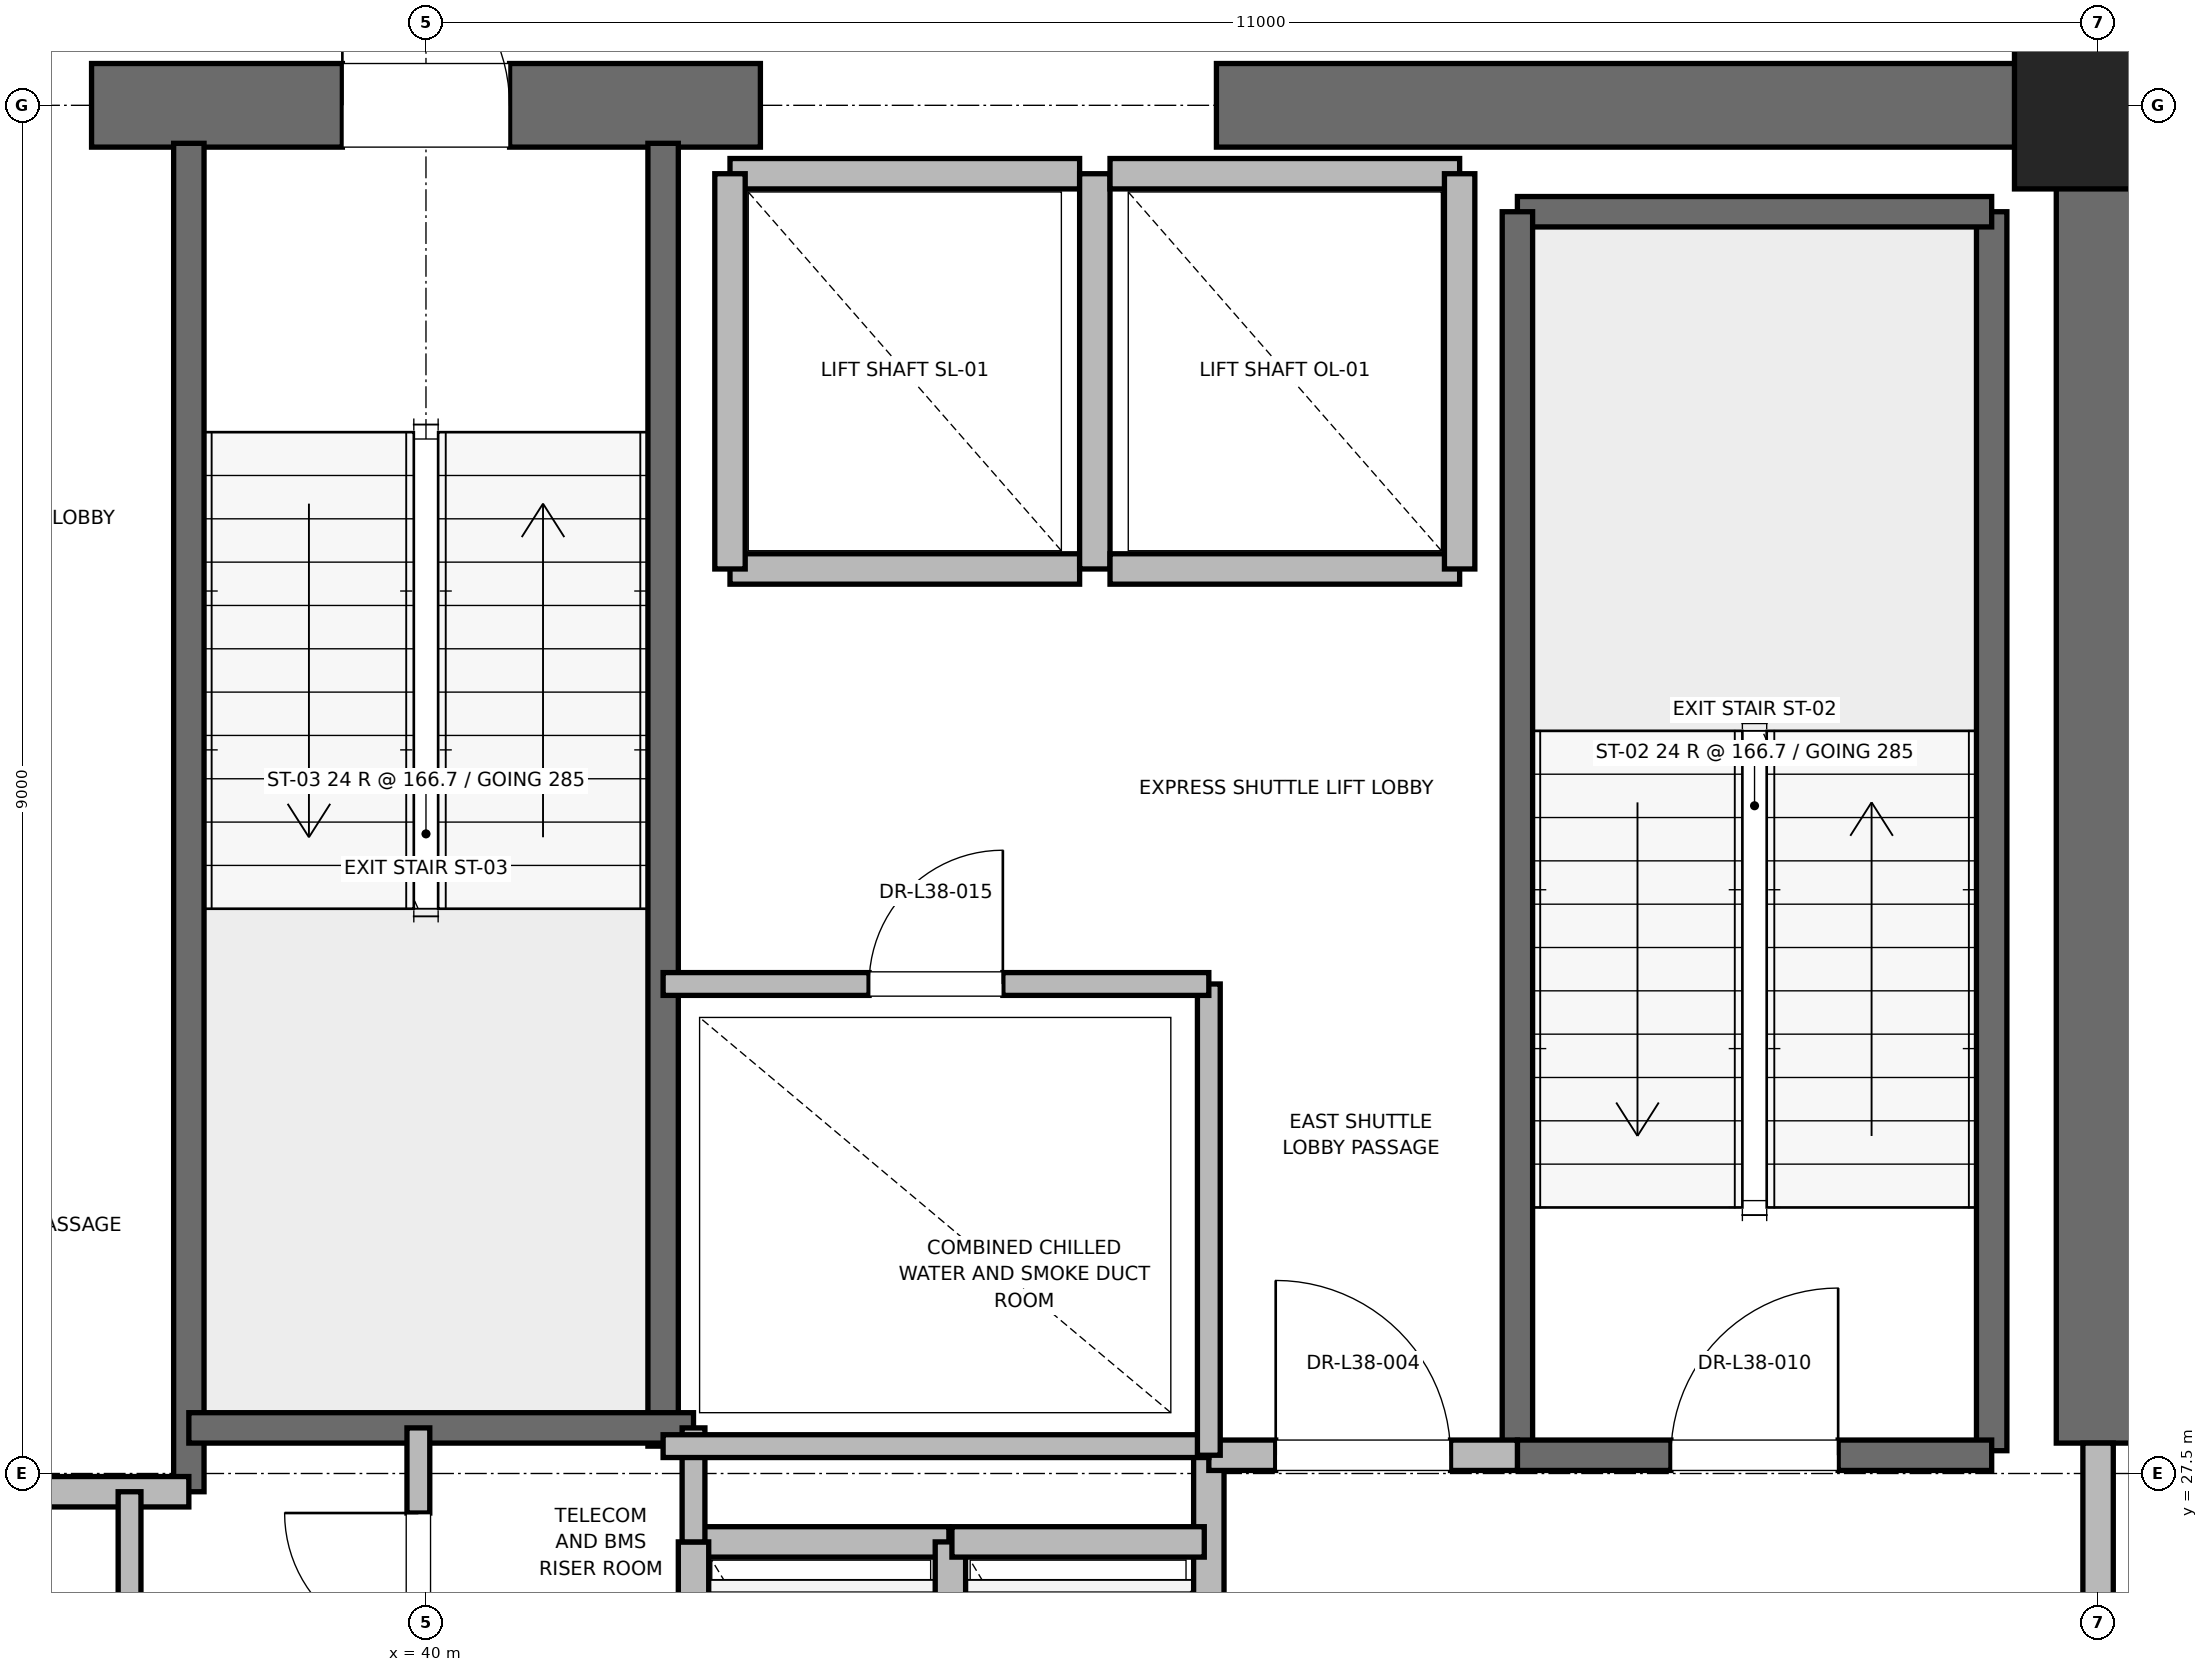
"""IFC4 building model, lengths in metres.
Left out: names, types, materials, properties, quantities, classifications, styles, units other than length and angle.
Written with IfcOpenShell. Run it as: python <this file> out.ifc"""

import sys

from ifc_helpers import new_model, si_unit, direction, frame, frame_2d, origin, origin_2d, place, context, subcontext, project, spatial, rectangle, extrude, element, fill, save


model = new_model("IFC4")
c1 = context("Model", 3, precision=1e-05, world=origin(), true_north=direction((0.0, 1.0)))
c2 = subcontext(c1, "Body", "Model", "MODEL_VIEW")
j1 = project(units=[si_unit("LENGTHUNIT", "METRE"), si_unit("PLANEANGLEUNIT", "RADIAN")], contexts=[c1])
p1 = place(None, origin())
s1 = spatial("IfcSite", under=j1, at=p1, CompositionType="ELEMENT")
p2 = place(p1, origin())
s2 = spatial("IfcBuilding", under=s1, at=p2, CompositionType="ELEMENT")
p3 = place(p2, frame((0.0, 0.0, 164.4)))
s3 = spatial("IfcBuildingStorey", under=s2, at=p3, CompositionType="ELEMENT", Elevation=164.4)
p4 = place(p3, frame((51.0, 36.5, 0.0), z_axis=(0.0, 0.0, 1.0), x_axis=(1.0, 0.0, 0.0)))
e1 = element("IfcColumn", 1, at=p4, inside=s3, PredefinedType="PILASTER", context=c2, shape_type="SweptSolid", body=[
    extrude(rectangle(XDim=1.1, YDim=1.1, at=origin_2d()), origin(), (0.0, 0.0, 1.0), 4.0),
])
p5 = place(p3, frame((37.8, 36.5, 0.0), z_axis=(0.0, 0.0, 1.0), x_axis=(1.0, 0.0, 0.0)))
e2 = element("IfcWall", 2, at=p5, inside=s3, PredefinedType="SHEAR", context=c2, shape_type="SweptSolid", body=[
    extrude(rectangle(XDim=4.4, YDim=0.55, at=frame_2d((2.2, 0.0))), origin(), (0.0, 0.0, 1.0), 3.775),
])
p6 = place(p5, frame((1.65, 0.0, 0.0)))
e3 = element("IfcOpeningElement", 3, at=p6, cuts=e2, PredefinedType="OPENING", context=c2, shape_type="SweptSolid", body=[
    extrude(rectangle(XDim=1.1, YDim=2.15, at=frame_2d((0.55, 1.075))), frame((0.0, 0.275, 0.0), z_axis=(0.0, -1.0, 0.0), x_axis=(1.0, 0.0, 0.0)), (0.0, 0.0, 1.0), 0.55),
])
p7 = place(p3, frame((45.2, 36.5, 0.0), z_axis=(0.0, 0.0, 1.0), x_axis=(1.0, 0.0, 0.0)))
e4 = element("IfcWall", 4, at=p7, inside=s3, PredefinedType="SHEAR", context=c2, shape_type="SweptSolid", body=[
    extrude(rectangle(XDim=5.8, YDim=0.55, at=frame_2d((2.9, 0.0))), origin(), (0.0, 0.0, 1.0), 3.775),
])
p8 = place(p3, frame((51.0, 27.7, 0.0), z_axis=(0.0, 0.0, 1.0), x_axis=(0.0, 1.0, 0.0)))
e5 = element("IfcWall", 5, at=p8, inside=s3, PredefinedType="SHEAR", context=c2, shape_type="SweptSolid", body=[
    extrude(rectangle(XDim=8.8, YDim=0.55, at=frame_2d((4.4, 0.0))), origin(), (0.0, 0.0, 1.0), 3.775),
])
p9 = place(p3, frame((50.3, 27.65, 0.0), z_axis=(0.0, 0.0, 1.0), x_axis=(0.0, 1.0, 0.0)))
e6 = element("IfcWall", 6, at=p9, inside=s3, PredefinedType="SOLIDWALL", context=c2, shape_type="SweptSolid", body=[
    extrude(rectangle(XDim=8.15, YDim=0.2, at=frame_2d((4.075, 0.0))), origin(), (0.0, 0.0, 1.0), 3.775),
])
p10 = place(p3, frame((47.18, 35.8, 0.0), z_axis=(0.0, 0.0, 1.0), x_axis=(1.0, 0.0, 0.0)))
e7 = element("IfcWall", 7, at=p10, inside=s3, PredefinedType="SOLIDWALL", context=c2, shape_type="SweptSolid", body=[
    extrude(rectangle(XDim=3.12, YDim=0.2, at=frame_2d((1.56, 0.0))), origin(), (0.0, 0.0, 1.0), 3.775),
])
p11 = place(p3, frame((47.18, 27.62, 0.0), z_axis=(0.0, 0.0, 1.0), x_axis=(0.0, 1.0, 0.0)))
e8 = element("IfcWall", 8, at=p11, inside=s3, PredefinedType="SOLIDWALL", context=c2, shape_type="SweptSolid", body=[
    extrude(rectangle(XDim=8.18, YDim=0.2, at=frame_2d((4.09, 0.0))), origin(), (0.0, 0.0, 1.0), 3.775),
])
p12 = place(p3, frame((47.18, 27.62, 0.0), z_axis=(0.0, 0.0, 1.0), x_axis=(1.0, 0.0, 0.0)))
e9 = element("IfcWall", 9, at=p12, inside=s3, PredefinedType="SOLIDWALL", context=c2, shape_type="SweptSolid", body=[
    extrude(rectangle(XDim=3.12, YDim=0.2, at=frame_2d((1.56, 0.0))), origin(), (0.0, 0.0, 1.0), 3.775),
])
p13 = place(p12, frame((1.01, 0.0, 0.0)))
e10 = element("IfcOpeningElement", 10, at=p13, cuts=e9, PredefinedType="OPENING", context=c2, shape_type="SweptSolid", body=[
    extrude(rectangle(XDim=1.1, YDim=2.15, at=frame_2d((0.55, 1.075))), frame((0.0, 0.1, 0.0), z_axis=(0.0, -1.0, 0.0), x_axis=(1.0, 0.0, 0.0)), (0.0, 0.0, 1.0), 0.2),
])
p14 = place(p3, frame((38.44, 27.38, 0.0), z_axis=(0.0, 0.0, 1.0), x_axis=(0.0, 1.0, 0.0)))
e11 = element("IfcWall", 11, at=p14, inside=s3, PredefinedType="SOLIDWALL", context=c2, shape_type="SweptSolid", body=[
    extrude(rectangle(XDim=8.87, YDim=0.2, at=frame_2d((4.435, 0.0))), origin(), (0.0, 0.0, 1.0), 3.775),
])
p15 = place(p3, frame((41.56, 27.68, 0.0), z_axis=(0.0, 0.0, 1.0), x_axis=(0.0, 1.0, 0.0)))
e12 = element("IfcWall", 12, at=p15, inside=s3, PredefinedType="SOLIDWALL", context=c2, shape_type="SweptSolid", body=[
    extrude(rectangle(XDim=8.57, YDim=0.2, at=frame_2d((4.285, 0.0))), origin(), (0.0, 0.0, 1.0), 3.775),
])
p16 = place(p3, frame((38.44, 27.8, 0.0), z_axis=(0.0, 0.0, 1.0), x_axis=(1.0, 0.0, 0.0)))
e13 = element("IfcWall", 13, at=p16, inside=s3, PredefinedType="SOLIDWALL", context=c2, shape_type="SweptSolid", body=[
    extrude(rectangle(XDim=3.32, YDim=0.2, at=frame_2d((1.66, 0.0))), origin(), (0.0, 0.0, 1.0), 3.775),
])
p17 = place(p3, frame((32.82, 27.38, 0.0), z_axis=(0.0, 0.0, 1.0), x_axis=(1.0, 0.0, 0.0)))
e14 = element("IfcWall", 14, at=p17, inside=s3, PredefinedType="PARTITIONING", context=c2, shape_type="SweptSolid", body=[
    extrude(rectangle(XDim=5.62, YDim=0.2, at=frame_2d((2.81, 0.0))), origin(), (0.0, 0.0, 1.0), 3.775),
])
p18 = place(p3, frame((45.15, 24.25, 0.0), z_axis=(0.0, 0.0, 1.0), x_axis=(0.0, 1.0, 0.0)))
e15 = element("IfcWall", 15, at=p18, inside=s3, PredefinedType="PARTITIONING", context=c2, shape_type="SweptSolid", body=[
    extrude(rectangle(XDim=3.37, YDim=0.2, at=frame_2d((1.685, 0.0))), origin(), (0.0, 0.0, 1.0), 3.775),
])
p19 = place(p3, frame((45.15, 27.62, 0.0), z_axis=(0.0, 0.0, 1.0), x_axis=(1.0, 0.0, 0.0)))
e16 = element("IfcWall", 16, at=p19, inside=s3, PredefinedType="PARTITIONING", context=c2, shape_type="SweptSolid", body=[
    extrude(rectangle(XDim=2.03, YDim=0.2, at=frame_2d((1.015, 0.0))), origin(), (0.0, 0.0, 1.0), 3.775),
])
p20 = place(p19, frame((0.44, 0.0, 0.0)))
e17 = element("IfcOpeningElement", 17, at=p20, cuts=e16, PredefinedType="OPENING", context=c2, shape_type="SweptSolid", body=[
    extrude(rectangle(XDim=1.15, YDim=2.2, at=frame_2d((0.575, 1.1))), frame((0.0, 0.1, 0.0), z_axis=(0.0, -1.0, 0.0), x_axis=(1.0, 0.0, 0.0)), (0.0, 0.0, 1.0), 0.2),
])
p21 = place(p3, frame((51.0, 24.3, 0.0), z_axis=(0.0, 0.0, 1.0), x_axis=(0.0, 1.0, 0.0)))
e18 = element("IfcWall", 18, at=p21, inside=s3, PredefinedType="PARTITIONING", context=c2, shape_type="SweptSolid", body=[
    extrude(rectangle(XDim=3.4, YDim=0.2, at=frame_2d((1.7, 0.0))), origin(), (0.0, 0.0, 1.0), 2.755),
])
p22 = place(p21, frame((1.125, 0.0, 0.0)))
e19 = element("IfcOpeningElement", 19, at=p22, cuts=e18, PredefinedType="OPENING", context=c2, shape_type="SweptSolid", body=[
    extrude(rectangle(XDim=1.15, YDim=2.2, at=frame_2d((0.575, 1.1))), frame((0.0, 0.1, 0.0), z_axis=(0.0, -1.0, 0.0), x_axis=(1.0, 0.0, 0.0)), (0.0, 0.0, 1.0), 0.2),
])
p23 = place(p3, frame((43.44, 27.05, 0.0), z_axis=(0.0, 0.0, 1.0), x_axis=(-1.0, 0.0, 0.0)))
e20 = element("IfcWall", 20, at=p23, inside=s3, PredefinedType="SOLIDWALL", context=c2, shape_type="SweptSolid", body=[
    extrude(rectangle(XDim=1.68, YDim=0.2, at=frame_2d((0.84, 0.0))), origin(), (0.0, 0.0, 1.0), 3.775),
])
for number, where, z_axis, x_axis in (
    (21, (41.76, 27.05, 0.0), (0.0, 0.0, 1.0), (0.0, -1.0, 0.0)),
    (22, (43.45, 24.45, 0.0), (0.0, 0.0, 1.0), (0.0, 1.0, 0.0)),
):
    element("IfcWall", number, at=place(p3, frame(where, z_axis=z_axis, x_axis=x_axis)), inside=s3, PredefinedType="SOLIDWALL", context=c2, shape_type="SweptSolid", body=[
        extrude(rectangle(XDim=2.6, YDim=0.2, at=frame_2d((1.3, 0.0))), origin(), (0.0, 0.0, 1.0), 3.775),
    ])
p24 = place(p3, frame((45.12, 27.05, 0.0), z_axis=(0.0, 0.0, 1.0), x_axis=(-1.0, 0.0, 0.0)))
e23 = element("IfcWall", 23, at=p24, inside=s3, PredefinedType="SOLIDWALL", context=c2, shape_type="SweptSolid", body=[
    extrude(rectangle(XDim=1.66, YDim=0.2, at=frame_2d((0.83, 0.0))), origin(), (0.0, 0.0, 1.0), 3.775),
])
p25 = place(p3, frame((42.0, 33.45, 0.0), z_axis=(0.0, 0.0, 1.0), x_axis=(1.0, 0.0, 0.0)))
e24 = element("IfcWall", 24, at=p25, inside=s3, PredefinedType="SOLIDWALL", context=c2, shape_type="SweptSolid", body=[
    extrude(rectangle(XDim=2.3, YDim=0.2, at=frame_2d((1.15, 0.0))), origin(), (0.0, 0.0, 1.0), 3.775),
])
p26 = place(p3, frame((44.3, 36.05, 0.0), z_axis=(0.0, 0.0, 1.0), x_axis=(-1.0, 0.0, 0.0)))
e25 = element("IfcWall", 25, at=p26, inside=s3, PredefinedType="SOLIDWALL", context=c2, shape_type="SweptSolid", body=[
    extrude(rectangle(XDim=2.3, YDim=0.2, at=frame_2d((1.15, 0.0))), origin(), (0.0, 0.0, 1.0), 2.755),
])
for number, where, z_axis, x_axis in (
    (26, (42.0, 36.05, 0.0), (0.0, 0.0, 1.0), (0.0, -1.0, 0.0)),
    (27, (44.4, 33.45, 0.0), (0.0, 0.0, 1.0), (0.0, 1.0, 0.0)),
):
    element("IfcWall", number, at=place(p3, frame(where, z_axis=z_axis, x_axis=x_axis)), inside=s3, PredefinedType="SOLIDWALL", context=c2, shape_type="SweptSolid", body=[
        extrude(rectangle(XDim=2.6, YDim=0.2, at=frame_2d((1.3, 0.0))), origin(), (0.0, 0.0, 1.0), 2.755),
    ])
p27 = place(p3, frame((44.5, 33.45, 0.0), z_axis=(0.0, 0.0, 1.0), x_axis=(1.0, 0.0, 0.0)))
e28 = element("IfcWall", 28, at=p27, inside=s3, PredefinedType="SOLIDWALL", context=c2, shape_type="SweptSolid", body=[
    extrude(rectangle(XDim=2.3, YDim=0.2, at=frame_2d((1.15, 0.0))), origin(), (0.0, 0.0, 1.0), 3.775),
])
p28 = place(p3, frame((46.8, 36.05, 0.0), z_axis=(0.0, 0.0, 1.0), x_axis=(-1.0, 0.0, 0.0)))
e29 = element("IfcWall", 29, at=p28, inside=s3, PredefinedType="SOLIDWALL", context=c2, shape_type="SweptSolid", body=[
    extrude(rectangle(XDim=2.3, YDim=0.2, at=frame_2d((1.15, 0.0))), origin(), (0.0, 0.0, 1.0), 2.755),
])
p29 = place(p3, frame((46.8, 33.45, 0.0), z_axis=(0.0, 0.0, 1.0), x_axis=(0.0, 1.0, 0.0)))
e30 = element("IfcWall", 30, at=p29, inside=s3, PredefinedType="SOLIDWALL", context=c2, shape_type="SweptSolid", body=[
    extrude(rectangle(XDim=2.6, YDim=0.2, at=frame_2d((1.3, 0.0))), origin(), (0.0, 0.0, 1.0), 3.775),
])
p30 = place(p3, frame((41.76, 27.05, 0.0), z_axis=(0.0, 0.0, 1.0), x_axis=(0.0, 1.0, 0.0)))
e31 = element("IfcWall", 31, at=p30, inside=s3, PredefinedType="PARTITIONING", context=c2, shape_type="SweptSolid", body=[
    extrude(rectangle(XDim=0.75, YDim=0.15, at=frame_2d((0.375, 0.0))), origin(), (0.0, 0.0, 1.0), 2.85),
])
p31 = place(p3, frame((39.95, 25.8, 0.0), z_axis=(0.0, 0.0, 1.0), x_axis=(0.0, 1.0, 0.0)))
e32 = element("IfcWall", 32, at=p31, inside=s3, PredefinedType="PARTITIONING", context=c2, shape_type="SweptSolid", body=[
    extrude(rectangle(XDim=2.0, YDim=0.15, at=frame_2d((1.0, 0.0))), origin(), (0.0, 0.0, 1.0), 2.85),
])
p32 = place(p31, frame((0.56, 0.0, 0.0)))
e33 = element("IfcOpeningElement", 33, at=p32, cuts=e32, PredefinedType="OPENING", context=c2, shape_type="SweptSolid", body=[
    extrude(rectangle(XDim=0.88, YDim=2.1, at=frame_2d((0.44, 1.05))), frame((0.0, 0.075, 0.0), z_axis=(0.0, -1.0, 0.0), x_axis=(1.0, 0.0, 0.0)), (0.0, 0.0, 1.0), 0.15),
])
p33 = place(p3, frame((38.05, 18.6, 0.0), z_axis=(0.0, 0.0, 1.0), x_axis=(0.0, 1.0, 0.0)))
e34 = element("IfcWall", 34, at=p33, inside=s3, PredefinedType="PARTITIONING", context=c2, shape_type="SweptSolid", body=[
    extrude(rectangle(XDim=8.78, YDim=0.15, at=frame_2d((4.39, 0.0))), origin(), (0.0, 0.0, 1.0), 2.755),
])
p34 = place(p33, frame((3.89, 0.0, 0.0)))
e35 = element("IfcOpeningElement", 35, at=p34, cuts=e34, PredefinedType="OPENING", context=c2, shape_type="SweptSolid", body=[
    extrude(rectangle(XDim=1.0, YDim=2.15, at=frame_2d((0.5, 1.075))), frame((0.0, 0.075, 0.0), z_axis=(0.0, -1.0, 0.0), x_axis=(1.0, 0.0, 0.0)), (0.0, 0.0, 1.0), 0.15),
])
p35 = place(p3, frame((41.56, 27.68, 0.0), z_axis=(0.0, 0.0, 1.0), x_axis=(1.0, 0.0, 0.0)))
e36 = element("IfcWall", 36, at=p35, inside=s3, PredefinedType="PARTITIONING", context=c2, shape_type="SweptSolid", body=[
    extrude(rectangle(XDim=3.59, YDim=0.15, at=frame_2d((1.795, 0.0))), origin(), (0.0, 0.0, 1.0), 2.85),
])
p36 = place(p3, frame((45.15, 27.62, 0.0), z_axis=(0.0, 0.0, 1.0), x_axis=(0.0, 1.0, 0.0)))
e37 = element("IfcWall", 37, at=p36, inside=s3, PredefinedType="PARTITIONING", context=c2, shape_type="SweptSolid", body=[
    extrude(rectangle(XDim=3.1, YDim=0.15, at=frame_2d((1.55, 0.0))), origin(), (0.0, 0.0, 1.0), 2.85),
])
p37 = place(p3, frame((41.56, 30.72, 0.0), z_axis=(0.0, 0.0, 1.0), x_axis=(1.0, 0.0, 0.0)))
e38 = element("IfcWall", 38, at=p37, inside=s3, PredefinedType="PARTITIONING", context=c2, shape_type="SweptSolid", body=[
    extrude(rectangle(XDim=3.59, YDim=0.15, at=frame_2d((1.795, 0.0))), origin(), (0.0, 0.0, 1.0), 2.85),
])
p38 = place(p37, frame((1.355, 0.0, 0.0)))
e39 = element("IfcOpeningElement", 39, at=p38, cuts=e38, PredefinedType="OPENING", context=c2, shape_type="SweptSolid", body=[
    extrude(rectangle(XDim=0.88, YDim=2.1, at=frame_2d((0.44, 1.05))), frame((0.0, 0.075, 0.0), z_axis=(0.0, -1.0, 0.0), x_axis=(1.0, 0.0, 0.0)), (0.0, 0.0, 1.0), 0.15),
])
p39 = place(p13, origin())
e40 = element("IfcDoor", 40, at=p39, inside=s3, OperationType="SINGLE_SWING_RIGHT", PredefinedType="DOOR", context=c2, shape_type="SweptSolid", body=[
    extrude(rectangle(XDim=1.1, YDim=2.15, at=frame_2d((0.55, 1.075))), frame((0.0, 0.025, 0.0), z_axis=(0.0, -1.0, 0.0), x_axis=(1.0, 0.0, 0.0)), (0.0, 0.0, 1.0), 0.05),
])
fill(e10, e40)
p40 = place(p6, origin())
e41 = element("IfcDoor", 41, at=p40, inside=s3, OperationType="SINGLE_SWING_LEFT", PredefinedType="DOOR", context=c2, shape_type="SweptSolid", body=[
    extrude(rectangle(XDim=1.1, YDim=2.15, at=frame_2d((0.55, 1.075))), frame((0.0, 0.025, 0.0), z_axis=(0.0, -1.0, 0.0), x_axis=(1.0, 0.0, 0.0)), (0.0, 0.0, 1.0), 0.05),
])
fill(e3, e41)
p41 = place(p20, origin())
e42 = element("IfcDoor", 42, at=p41, inside=s3, OperationType="SINGLE_SWING_LEFT", PredefinedType="DOOR", context=c2, shape_type="SweptSolid", body=[
    extrude(rectangle(XDim=1.15, YDim=2.2, at=frame_2d((0.575, 1.1))), frame((0.0, 0.025, 0.0), z_axis=(0.0, -1.0, 0.0), x_axis=(1.0, 0.0, 0.0)), (0.0, 0.0, 1.0), 0.05),
])
fill(e17, e42)
p42 = place(p32, origin())
e43 = element("IfcDoor", 43, at=p42, inside=s3, OperationType="SINGLE_SWING_RIGHT", PredefinedType="DOOR", context=c2, shape_type="SweptSolid", body=[
    extrude(rectangle(XDim=0.88, YDim=2.1, at=frame_2d((0.44, 1.05))), frame((0.0, 0.025, 0.0), z_axis=(0.0, -1.0, 0.0), x_axis=(1.0, 0.0, 0.0)), (0.0, 0.0, 1.0), 0.05),
])
fill(e33, e43)
p43 = place(p38, origin())
e44 = element("IfcDoor", 44, at=p43, inside=s3, OperationType="SINGLE_SWING_RIGHT", PredefinedType="DOOR", context=c2, shape_type="SweptSolid", body=[
    extrude(rectangle(XDim=0.88, YDim=2.1, at=frame_2d((0.44, 1.05))), frame((0.0, 0.025, 0.0), z_axis=(0.0, -1.0, 0.0), x_axis=(1.0, 0.0, 0.0)), (0.0, 0.0, 1.0), 0.05),
])
fill(e39, e44)
save(model, sys.argv[1])
